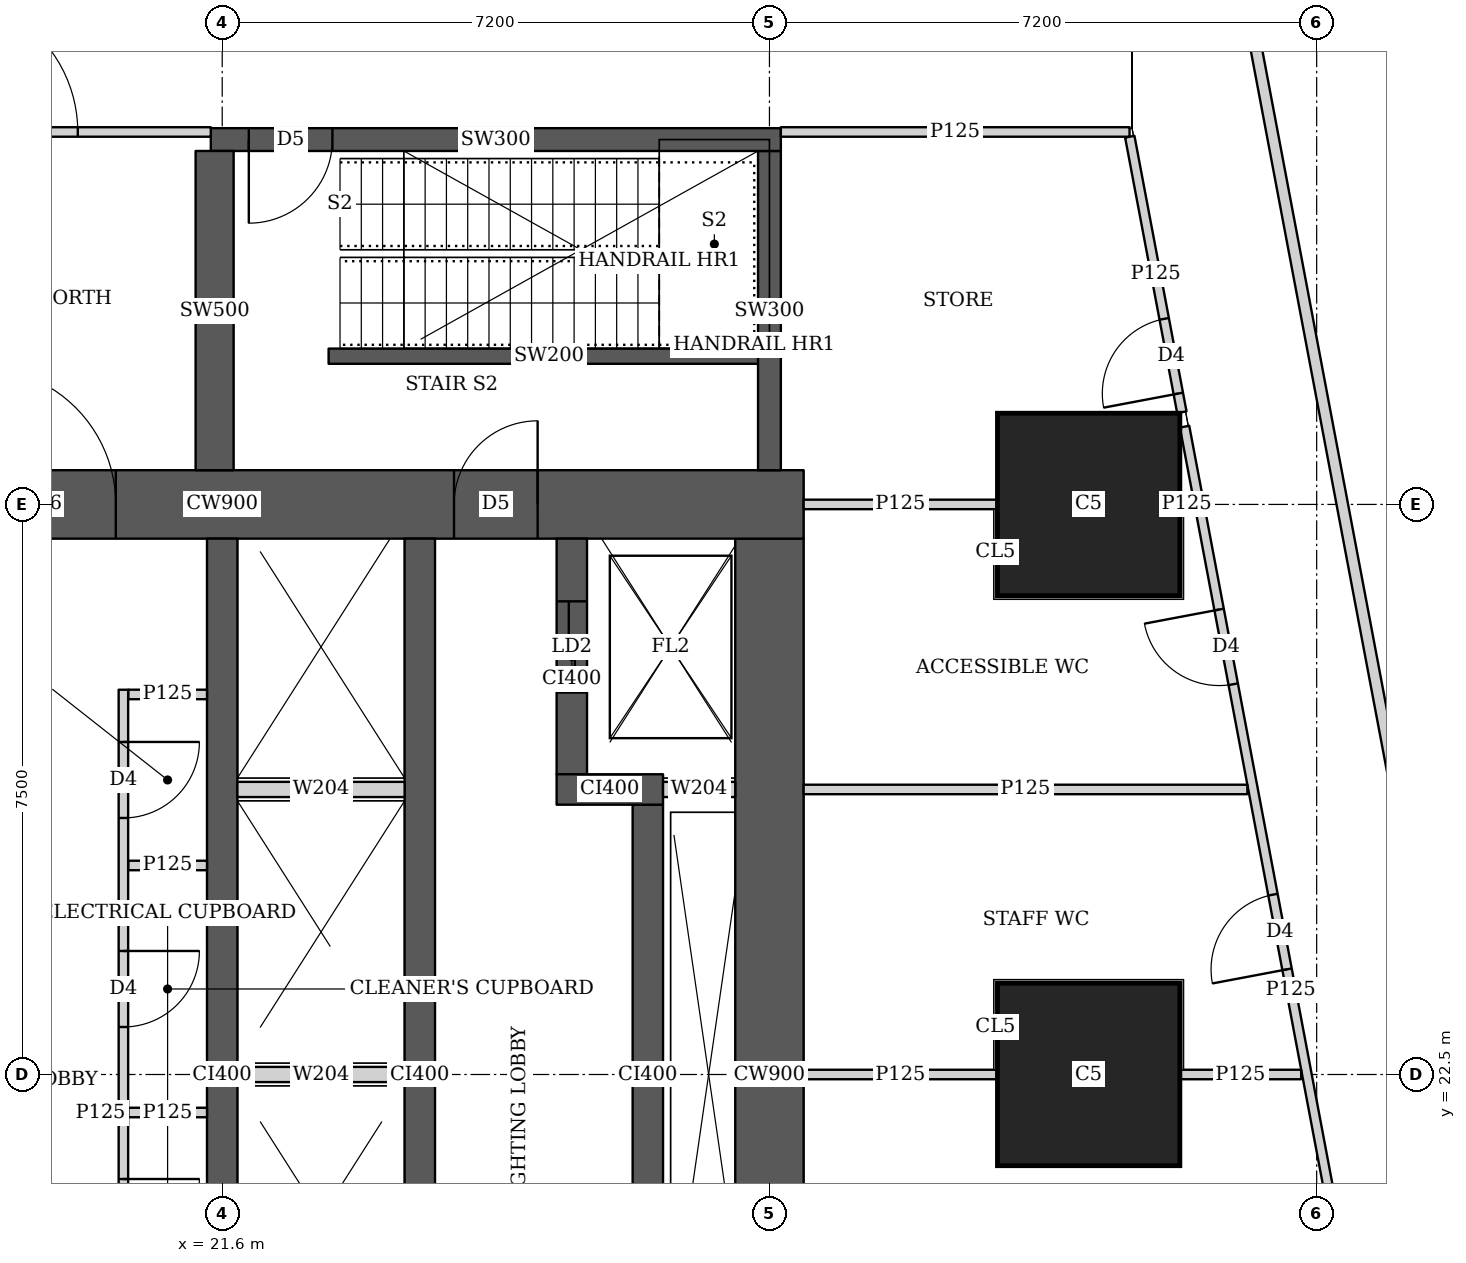
"""IFC4 building model, lengths in metres.
Left out: names, types, materials, properties, quantities, classifications, styles, units other than length and angle.
Written with IfcOpenShell. Run it as: python <this file> out.ifc"""

import sys

from ifc_helpers import new_model, si_unit, direction, frame, frame_2d, origin, origin_2d, place, context, subcontext, project, spatial, rectangle, extrude, element, fill, save


model = new_model("IFC4")
c1 = context("Model", 3, precision=1e-05, world=origin(), true_north=direction((0.0, 1.0)))
c2 = subcontext(c1, "Body", "Model", "MODEL_VIEW")
j1 = project(units=[si_unit("LENGTHUNIT", "METRE"), si_unit("PLANEANGLEUNIT", "RADIAN")], contexts=[c1])
p1 = place(None, origin())
s1 = spatial("IfcSite", under=j1, at=p1, CompositionType="ELEMENT")
p2 = place(p1, origin())
s2 = spatial("IfcBuilding", under=s1, at=p2, CompositionType="ELEMENT")
p3 = place(p2, frame((0.0, 0.0, 14.6)))
s3 = spatial("IfcBuildingStorey", under=s2, at=p3, CompositionType="ELEMENT", Elevation=14.6)
for number, where, z_axis, x_axis in (
    (1, (33.0, 22.5, 0.0), (0.0, 0.0, 1.0), (1.0, 0.0, 0.0)),
    (2, (33.0, 30.0, 0.0), (0.0, 0.0, 1.0), (1.0, 0.0, 0.0)),
):
    element("IfcColumn", number, at=place(p3, frame(where, z_axis=z_axis, x_axis=x_axis)), inside=s3, PredefinedType="COLUMN", context=c2, shape_type="SweptSolid", body=[
        extrude(rectangle(XDim=2.4, YDim=2.4, at=origin_2d()), origin(), (0.0, 0.0, 1.0), 5.4),
    ])
p4 = place(p3, frame((13.95, 30.0, 0.0), z_axis=(0.0, 0.0, 1.0), x_axis=(1.0, 0.0, 0.0)))
e3 = element("IfcWall", 3, at=p4, inside=s3, PredefinedType="SHEAR", context=c2, shape_type="SweptSolid", body=[
    extrude(rectangle(XDim=15.3, YDim=0.9, at=frame_2d((7.65, 0.0))), origin(), (0.0, 0.0, 1.0), 5.4),
])
p5 = place(p4, frame((4.45, 0.0, 0.0)))
e4 = element("IfcOpeningElement", 4, at=p5, cuts=e3, PredefinedType="OPENING", context=c2, shape_type="SweptSolid", body=[
    extrude(rectangle(XDim=1.8, YDim=2.1, at=frame_2d((0.9, 1.05))), frame((0.0, 0.46, 0.0), z_axis=(0.0, -1.0, 0.0), x_axis=(1.0, 0.0, 0.0)), (0.0, 0.0, 1.0), 0.92),
])
p6 = place(p4, frame((10.7, 0.0, 0.0)))
e5 = element("IfcOpeningElement", 5, at=p6, cuts=e3, PredefinedType="OPENING", context=c2, shape_type="SweptSolid", body=[
    extrude(rectangle(XDim=1.1, YDim=2.1, at=frame_2d((0.55, 1.05))), frame((0.0, 0.46, 0.0), z_axis=(0.0, -1.0, 0.0), x_axis=(1.0, 0.0, 0.0)), (0.0, 0.0, 1.0), 0.92),
])
p7 = place(p3, frame((28.8, 15.45, 0.0), z_axis=(0.0, 0.0, 1.0), x_axis=(0.0, 1.0, 0.0)))
e6 = element("IfcWall", 6, at=p7, inside=s3, PredefinedType="SHEAR", context=c2, shape_type="SweptSolid", body=[
    extrude(rectangle(XDim=14.1, YDim=0.9, at=frame_2d((7.05, 0.0))), origin(), (0.0, 0.0, 1.0), 5.4),
])
for number, where, z_axis, x_axis in (
    (7, (21.6, 15.45, 0.0), (0.0, 0.0, 1.0), (0.0, 1.0, 0.0)),
    (8, (24.2, 15.45, 0.0), (0.0, 0.0, 1.0), (0.0, 1.0, 0.0)),
):
    element("IfcWall", number, at=place(p3, frame(where, z_axis=z_axis, x_axis=x_axis)), inside=s3, PredefinedType="SHEAR", context=c2, shape_type="SweptSolid", body=[
        extrude(rectangle(XDim=14.1, YDim=0.4, at=frame_2d((7.05, 0.0))), origin(), (0.0, 0.0, 1.0), 5.4),
    ])
p8 = place(p3, frame((27.2, 18.95, 0.0), z_axis=(0.0, 0.0, 1.0), x_axis=(0.0, 1.0, 0.0)))
e9 = element("IfcWall", 9, at=p8, inside=s3, PredefinedType="SHEAR", context=c2, shape_type="SweptSolid", body=[
    extrude(rectangle(XDim=7.1, YDim=0.4, at=frame_2d((3.55, 0.0))), origin(), (0.0, 0.0, 1.0), 5.4),
])
p9 = place(p3, frame((26.0, 26.25, 0.0), z_axis=(0.0, 0.0, 1.0), x_axis=(1.0, 0.0, 0.0)))
e10 = element("IfcWall", 10, at=p9, inside=s3, PredefinedType="SHEAR", context=c2, shape_type="SweptSolid", body=[
    extrude(rectangle(XDim=1.4, YDim=0.4, at=frame_2d((0.7, 0.0))), origin(), (0.0, 0.0, 1.0), 5.4),
])
p10 = place(p3, frame((26.2, 26.45, 0.0), z_axis=(0.0, 0.0, 1.0), x_axis=(0.0, 1.0, 0.0)))
e11 = element("IfcWall", 11, at=p10, inside=s3, PredefinedType="SHEAR", context=c2, shape_type="SweptSolid", body=[
    extrude(rectangle(XDim=3.1, YDim=0.4, at=frame_2d((1.55, 0.0))), origin(), (0.0, 0.0, 1.0), 5.4),
])
p11 = place(p10, frame((1.075, 0.0, 0.0)))
e12 = element("IfcOpeningElement", 12, at=p11, cuts=e11, PredefinedType="OPENING", context=c2, shape_type="SweptSolid", body=[
    extrude(rectangle(XDim=1.2, YDim=2.1, at=frame_2d((0.6, 1.05))), frame((0.0, 0.21, 0.0), z_axis=(0.0, -1.0, 0.0), x_axis=(1.0, 0.0, 0.0)), (0.0, 0.0, 1.0), 0.42),
])
p12 = place(p3, frame((21.45, 34.8, 0.0), z_axis=(0.0, 0.0, 1.0), x_axis=(1.0, 0.0, 0.0)))
e13 = element("IfcWall", 13, at=p12, inside=s3, PredefinedType="SHEAR", context=c2, shape_type="SweptSolid", body=[
    extrude(rectangle(XDim=7.5, YDim=0.3, at=frame_2d((3.75, 0.0))), origin(), (0.0, 0.0, 1.0), 5.4),
])
p13 = place(p12, frame((0.5, 0.0, 0.0)))
e14 = element("IfcOpeningElement", 14, at=p13, cuts=e13, PredefinedType="OPENING", context=c2, shape_type="SweptSolid", body=[
    extrude(rectangle(XDim=1.1, YDim=2.1, at=frame_2d((0.55, 1.05))), frame((0.0, 0.16, 0.0), z_axis=(0.0, -1.0, 0.0), x_axis=(1.0, 0.0, 0.0)), (0.0, 0.0, 1.0), 0.32),
])
p14 = place(p3, frame((21.5, 30.45, 0.0), z_axis=(0.0, 0.0, 1.0), x_axis=(0.0, 1.0, 0.0)))
e15 = element("IfcWall", 15, at=p14, inside=s3, PredefinedType="SHEAR", context=c2, shape_type="SweptSolid", body=[
    extrude(rectangle(XDim=4.2, YDim=0.5, at=frame_2d((2.1, 0.0))), origin(), (0.0, 0.0, 1.0), 5.4),
])
p15 = place(p3, frame((28.8, 30.45, 0.0), z_axis=(0.0, 0.0, 1.0), x_axis=(0.0, 1.0, 0.0)))
e16 = element("IfcWall", 16, at=p15, inside=s3, PredefinedType="SHEAR", context=c2, shape_type="SweptSolid", body=[
    extrude(rectangle(XDim=4.2, YDim=0.3, at=frame_2d((2.1, 0.0))), origin(), (0.0, 0.0, 1.0), 5.4),
])
p16 = place(p3, frame((35.15, 36.285, 0.0), z_axis=(0.0, 0.0, 1.0), x_axis=(0.185613484682, -0.982622834207, 0.0)))
e17 = element("IfcWall", 17, at=p16, inside=s3, PredefinedType="SOLIDWALL", context=c2, shape_type="SweptSolid", body=[
    extrude(rectangle(XDim=34.351, YDim=0.15, at=frame_2d((17.175, 0.0))), origin(), (0.0, 0.0, 1.0), 3.5),
])
p17 = place(p16, frame((13.652, 0.0, 0.0)))
e18 = element("IfcOpeningElement", 18, at=p17, cuts=e17, PredefinedType="OPENING", context=c2, shape_type="SweptSolid", body=[
    extrude(rectangle(XDim=1.8, YDim=2.4, at=frame_2d((0.9, 1.2))), frame((0.0, 0.085, 0.0), z_axis=(0.0, -1.0, 0.0), x_axis=(1.0, 0.0, 0.0)), (0.0, 0.0, 1.0), 0.17),
])
p18 = place(p3, frame((10.163, 34.9, 0.0), z_axis=(0.0, 0.0, 1.0), x_axis=(1.0, 0.0, 0.0)))
e19 = element("IfcWall", 19, at=p18, inside=s3, PredefinedType="PARTITIONING", context=c2, shape_type="SweptSolid", body=[
    extrude(rectangle(XDim=11.287, YDim=0.125, at=frame_2d((5.644, 0.0))), origin(), (0.0, 0.0, 1.0), 3.1),
])
p19 = place(p18, frame((7.737, 0.0, 0.0)))
e20 = element("IfcOpeningElement", 20, at=p19, cuts=e19, PredefinedType="OPENING", context=c2, shape_type="SweptSolid", body=[
    extrude(rectangle(XDim=1.8, YDim=2.1, at=frame_2d((0.9, 1.05))), frame((0.0, 0.073, 0.0), z_axis=(0.0, -1.0, 0.0), x_axis=(1.0, 0.0, 0.0)), (0.0, 0.0, 1.0), 0.145),
])
p20 = place(p3, frame((28.95, 34.9, 0.0), z_axis=(0.0, 0.0, 1.0), x_axis=(1.0, 0.0, 0.0)))
e21 = element("IfcWall", 21, at=p20, inside=s3, PredefinedType="PARTITIONING", context=c2, shape_type="SweptSolid", body=[
    extrude(rectangle(XDim=4.588, YDim=0.125, at=frame_2d((2.294, 0.0))), origin(), (0.0, 0.0, 1.0), 3.1),
])
p21 = place(p3, frame((37.059, 16.213, 0.0), z_axis=(0.0, 0.0, 1.0), x_axis=(-0.185585225745, 0.982628171785, 0.0)))
e22 = element("IfcWall", 22, at=p21, inside=s3, PredefinedType="PARTITIONING", context=c2, shape_type="SweptSolid", body=[
    extrude(rectangle(XDim=15.072, YDim=0.125, at=frame_2d((7.536, 0.0))), origin(), (0.0, 0.0, 1.0), 3.5),
])
p22 = place(p21, frame((0.25, 0.0, 0.0)))
e23 = element("IfcOpeningElement", 23, at=p22, cuts=e22, PredefinedType="OPENING", context=c2, shape_type="SweptSolid", body=[
    extrude(rectangle(XDim=1.0, YDim=2.1, at=frame_2d((0.5, 1.05))), frame((0.0, 0.073, 0.0), z_axis=(0.0, -1.0, 0.0), x_axis=(1.0, 0.0, 0.0)), (0.0, 0.0, 1.0), 0.145),
])
p23 = place(p21, frame((7.806, 0.0, 0.0)))
e24 = element("IfcOpeningElement", 24, at=p23, cuts=e22, PredefinedType="OPENING", context=c2, shape_type="SweptSolid", body=[
    extrude(rectangle(XDim=1.0, YDim=2.1, at=frame_2d((0.5, 1.05))), frame((0.0, 0.073, 0.0), z_axis=(0.0, -1.0, 0.0), x_axis=(1.0, 0.0, 0.0)), (0.0, 0.0, 1.0), 0.145),
])
p24 = place(p21, frame((11.623, 0.0, 0.0)))
e25 = element("IfcOpeningElement", 25, at=p24, cuts=e22, PredefinedType="OPENING", context=c2, shape_type="SweptSolid", body=[
    extrude(rectangle(XDim=1.0, YDim=2.1, at=frame_2d((0.5, 1.05))), frame((0.0, 0.073, 0.0), z_axis=(0.0, -1.0, 0.0), x_axis=(1.0, 0.0, 0.0)), (0.0, 0.0, 1.0), 0.145),
])
p25 = place(p3, frame((34.226, 31.213, 0.0), z_axis=(0.0, 0.0, 1.0), x_axis=(-0.185694811189, 0.982607468472, 0.0)))
e26 = element("IfcWall", 26, at=p25, inside=s3, PredefinedType="PARTITIONING", context=c2, shape_type="SweptSolid", body=[
    extrude(rectangle(XDim=3.689, YDim=0.125, at=frame_2d((1.845, 0.0))), origin(), (0.0, 0.0, 1.0), 5.1),
])
p26 = place(p25, frame((0.25, 0.0, 0.0)))
e27 = element("IfcOpeningElement", 27, at=p26, cuts=e26, PredefinedType="OPENING", context=c2, shape_type="SweptSolid", body=[
    extrude(rectangle(XDim=1.0, YDim=2.1, at=frame_2d((0.5, 1.05))), frame((0.0, 0.073, 0.0), z_axis=(0.0, -1.0, 0.0), x_axis=(1.0, 0.0, 0.0)), (0.0, 0.0, 1.0), 0.145),
])
p27 = place(p3, frame((29.25, 22.5, 0.0), z_axis=(0.0, 0.0, 1.0), x_axis=(1.0, 0.0, 0.0)))
e28 = element("IfcWall", 28, at=p27, inside=s3, PredefinedType="PARTITIONING", context=c2, shape_type="SweptSolid", body=[
    extrude(rectangle(XDim=2.549, YDim=0.125, at=frame_2d((1.274, 0.0))), origin(), (0.0, 0.0, 1.0), 3.5),
])
p28 = place(p3, frame((34.201, 22.5, 0.0), z_axis=(0.0, 0.0, 1.0), x_axis=(1.0, 0.0, 0.0)))
e29 = element("IfcWall", 29, at=p28, inside=s3, PredefinedType="PARTITIONING", context=c2, shape_type="SweptSolid", body=[
    extrude(rectangle(XDim=1.595, YDim=0.125, at=frame_2d((0.797, 0.0))), origin(), (0.0, 0.0, 1.0), 3.5),
])
p29 = place(p3, frame((29.25, 30.0, 0.0), z_axis=(0.0, 0.0, 1.0), x_axis=(1.0, 0.0, 0.0)))
e30 = element("IfcWall", 30, at=p29, inside=s3, PredefinedType="PARTITIONING", context=c2, shape_type="SweptSolid", body=[
    extrude(rectangle(XDim=2.549, YDim=0.125, at=frame_2d((1.274, 0.0))), origin(), (0.0, 0.0, 1.0), 5.1),
])
p30 = place(p3, frame((34.201, 30.0, 0.0), z_axis=(0.0, 0.0, 1.0), x_axis=(1.0, 0.0, 0.0)))
e31 = element("IfcWall", 31, at=p30, inside=s3, PredefinedType="PARTITIONING", context=c2, shape_type="SweptSolid", body=[
    extrude(rectangle(XDim=0.178, YDim=0.125, at=frame_2d((0.089, 0.0))), origin(), (0.0, 0.0, 1.0), 3.5),
])
p31 = place(p3, frame((29.25, 26.25, 0.0), z_axis=(0.0, 0.0, 1.0), x_axis=(1.0, 0.0, 0.0)))
e32 = element("IfcWall", 32, at=p31, inside=s3, PredefinedType="PARTITIONING", context=c2, shape_type="SweptSolid", body=[
    extrude(rectangle(XDim=5.838, YDim=0.125, at=frame_2d((2.919, 0.0))), origin(), (0.0, 0.0, 1.0), 5.1),
])
p32 = place(p3, frame((20.3, 16.438, 0.0), z_axis=(0.0, 0.0, 1.0), x_axis=(0.0, 1.0, 0.0)))
e33 = element("IfcWall", 33, at=p32, inside=s3, PredefinedType="PARTITIONING", context=c2, shape_type="SweptSolid", body=[
    extrude(rectangle(XDim=11.124, YDim=0.125, at=frame_2d((5.562, 0.0))), origin(), (0.0, 0.0, 1.0), 5.1),
])
p33 = place(p32, frame((0.937, 0.0, 0.0)))
e34 = element("IfcOpeningElement", 34, at=p33, cuts=e33, PredefinedType="OPENING", context=c2, shape_type="SweptSolid", body=[
    extrude(rectangle(XDim=1.0, YDim=2.1, at=frame_2d((0.5, 1.05))), frame((0.0, 0.073, 0.0), z_axis=(0.0, -1.0, 0.0), x_axis=(1.0, 0.0, 0.0)), (0.0, 0.0, 1.0), 0.145),
])
p34 = place(p32, frame((3.687, 0.0, 0.0)))
e35 = element("IfcOpeningElement", 35, at=p34, cuts=e33, PredefinedType="OPENING", context=c2, shape_type="SweptSolid", body=[
    extrude(rectangle(XDim=1.0, YDim=2.1, at=frame_2d((0.5, 1.05))), frame((0.0, 0.073, 0.0), z_axis=(0.0, -1.0, 0.0), x_axis=(1.0, 0.0, 0.0)), (0.0, 0.0, 1.0), 0.145),
])
p35 = place(p32, frame((6.687, 0.0, 0.0)))
e36 = element("IfcOpeningElement", 36, at=p35, cuts=e33, PredefinedType="OPENING", context=c2, shape_type="SweptSolid", body=[
    extrude(rectangle(XDim=1.0, YDim=2.1, at=frame_2d((0.5, 1.05))), frame((0.0, 0.073, 0.0), z_axis=(0.0, -1.0, 0.0), x_axis=(1.0, 0.0, 0.0)), (0.0, 0.0, 1.0), 0.145),
])
p36 = place(p32, frame((9.437, 0.0, 0.0)))
e37 = element("IfcOpeningElement", 37, at=p36, cuts=e33, PredefinedType="OPENING", context=c2, shape_type="SweptSolid", body=[
    extrude(rectangle(XDim=1.0, YDim=2.1, at=frame_2d((0.5, 1.05))), frame((0.0, 0.073, 0.0), z_axis=(0.0, -1.0, 0.0), x_axis=(1.0, 0.0, 0.0)), (0.0, 0.0, 1.0), 0.145),
])
for number, where, z_axis, x_axis in (
    (38, (20.363, 27.5, 0.0), (0.0, 0.0, 1.0), (1.0, 0.0, 0.0)),
    (39, (20.363, 22.0, 0.0), (0.0, 0.0, 1.0), (1.0, 0.0, 0.0)),
    (40, (20.363, 25.25, 0.0), (0.0, 0.0, 1.0), (1.0, 0.0, 0.0)),
):
    element("IfcWall", number, at=place(p3, frame(where, z_axis=z_axis, x_axis=x_axis)), inside=s3, PredefinedType="PARTITIONING", context=c2, shape_type="SweptSolid", body=[
        extrude(rectangle(XDim=1.037, YDim=0.125, at=frame_2d((0.519, 0.0))), origin(), (0.0, 0.0, 1.0), 5.1),
    ])
p37 = place(p3, frame((23.0, 31.95, 0.0), z_axis=(0.0, 0.0, 1.0), x_axis=(1.0, 0.0, 0.0)))
e41 = element("IfcWall", 41, at=p37, inside=s3, PredefinedType="SHEAR", context=c2, shape_type="SweptSolid", body=[
    extrude(rectangle(XDim=5.8, YDim=0.2, at=frame_2d((2.9, 0.0))), origin(), (0.0, 0.0, 1.0), 5.4),
])
for number, where, z_axis, x_axis in (
    (42, (21.8, 22.5, 0.0), (0.0, 0.0, 1.0), (1.0, 0.0, 0.0)),
    (43, (21.8, 26.25, 0.0), (0.0, 0.0, 1.0), (1.0, 0.0, 0.0)),
):
    element("IfcWall", number, at=place(p3, frame(where, z_axis=z_axis, x_axis=x_axis)), inside=s3, PredefinedType="SOLIDWALL", context=c2, shape_type="SweptSolid", body=[
        extrude(rectangle(XDim=2.2, YDim=0.2, at=frame_2d((1.1, 0.0))), origin(), (0.0, 0.0, 1.0), 5.1),
    ])
p38 = place(p3, frame((27.4, 26.25, 0.0), z_axis=(0.0, 0.0, 1.0), x_axis=(1.0, 0.0, 0.0)))
e44 = element("IfcWall", 44, at=p38, inside=s3, PredefinedType="SOLIDWALL", context=c2, shape_type="SweptSolid", body=[
    extrude(rectangle(XDim=0.95, YDim=0.2, at=frame_2d((0.475, 0.0))), origin(), (0.0, 0.0, 1.0), 5.1),
])
p39 = place(p19, origin())
e45 = element("IfcDoor", 45, at=p39, inside=s3, OperationType="DOUBLE_DOOR_SINGLE_SWING", PredefinedType="DOOR", context=c2, shape_type="SweptSolid", body=[
    extrude(rectangle(XDim=1.8, YDim=2.1, at=frame_2d((0.9, 1.05))), frame((0.0, 0.025, 0.0), z_axis=(0.0, -1.0, 0.0), x_axis=(1.0, 0.0, 0.0)), (0.0, 0.0, 1.0), 0.05),
])
fill(e20, e45)
p40 = place(p26, origin())
e46 = element("IfcDoor", 46, at=p40, inside=s3, OperationType="SINGLE_SWING_LEFT", PredefinedType="DOOR", context=c2, shape_type="SweptSolid", body=[
    extrude(rectangle(XDim=1.0, YDim=2.1, at=frame_2d((0.5, 1.05))), frame((0.0, 0.025, 0.0), z_axis=(0.0, -1.0, 0.0), x_axis=(1.0, 0.0, 0.0)), (0.0, 0.0, 1.0), 0.05),
])
fill(e27, e46)
p41 = place(p23, origin())
e47 = element("IfcDoor", 47, at=p41, inside=s3, OperationType="SINGLE_SWING_LEFT", PredefinedType="DOOR", context=c2, shape_type="SweptSolid", body=[
    extrude(rectangle(XDim=1.0, YDim=2.1, at=frame_2d((0.5, 1.05))), frame((0.0, 0.025, 0.0), z_axis=(0.0, -1.0, 0.0), x_axis=(1.0, 0.0, 0.0)), (0.0, 0.0, 1.0), 0.05),
])
fill(e24, e47)
p42 = place(p24, origin())
e48 = element("IfcDoor", 48, at=p42, inside=s3, OperationType="SINGLE_SWING_RIGHT", PredefinedType="DOOR", context=c2, shape_type="SweptSolid", body=[
    extrude(rectangle(XDim=1.0, YDim=2.1, at=frame_2d((0.5, 1.05))), frame((0.0, 0.025, 0.0), z_axis=(0.0, -1.0, 0.0), x_axis=(1.0, 0.0, 0.0)), (0.0, 0.0, 1.0), 0.05),
])
fill(e25, e48)
p43 = place(p34, origin())
e49 = element("IfcDoor", 49, at=p43, inside=s3, OperationType="SINGLE_SWING_LEFT", PredefinedType="DOOR", context=c2, shape_type="SweptSolid", body=[
    extrude(rectangle(XDim=1.0, YDim=2.1, at=frame_2d((0.5, 1.05))), frame((0.0, 0.025, 0.0), z_axis=(0.0, -1.0, 0.0), x_axis=(1.0, 0.0, 0.0)), (0.0, 0.0, 1.0), 0.05),
])
fill(e35, e49)
p44 = place(p35, origin())
e50 = element("IfcDoor", 50, at=p44, inside=s3, OperationType="SINGLE_SWING_LEFT", PredefinedType="DOOR", context=c2, shape_type="SweptSolid", body=[
    extrude(rectangle(XDim=1.0, YDim=2.1, at=frame_2d((0.5, 1.05))), frame((0.0, 0.025, 0.0), z_axis=(0.0, -1.0, 0.0), x_axis=(1.0, 0.0, 0.0)), (0.0, 0.0, 1.0), 0.05),
])
fill(e36, e50)
p45 = place(p36, origin())
e51 = element("IfcDoor", 51, at=p45, inside=s3, OperationType="SINGLE_SWING_LEFT", PredefinedType="DOOR", context=c2, shape_type="SweptSolid", body=[
    extrude(rectangle(XDim=1.0, YDim=2.1, at=frame_2d((0.5, 1.05))), frame((0.0, 0.025, 0.0), z_axis=(0.0, -1.0, 0.0), x_axis=(1.0, 0.0, 0.0)), (0.0, 0.0, 1.0), 0.05),
])
fill(e37, e51)
p46 = place(p5, origin())
e52 = element("IfcDoor", 52, at=p46, inside=s3, OperationType="DOUBLE_DOOR_SINGLE_SWING", PredefinedType="DOOR", context=c2, shape_type="SweptSolid", body=[
    extrude(rectangle(XDim=1.8, YDim=2.1, at=frame_2d((0.9, 1.05))), frame((0.0, 0.025, 0.0), z_axis=(0.0, -1.0, 0.0), x_axis=(1.0, 0.0, 0.0)), (0.0, 0.0, 1.0), 0.05),
])
fill(e4, e52)
p47 = place(p6, origin())
e53 = element("IfcDoor", 53, at=p47, inside=s3, OperationType="SINGLE_SWING_RIGHT", PredefinedType="DOOR", context=c2, shape_type="SweptSolid", body=[
    extrude(rectangle(XDim=1.1, YDim=2.1, at=frame_2d((0.55, 1.05))), frame((0.0, 0.025, 0.0), z_axis=(0.0, -1.0, 0.0), x_axis=(1.0, 0.0, 0.0)), (0.0, 0.0, 1.0), 0.05),
])
fill(e5, e53)
p48 = place(p11, origin())
e54 = element("IfcDoor", 54, at=p48, inside=s3, OperationType="DOUBLE_DOOR_SLIDING", PredefinedType="DOOR", context=c2, shape_type="SweptSolid", body=[
    extrude(rectangle(XDim=1.2, YDim=2.1, at=frame_2d((0.6, 1.05))), frame((0.0, 0.025, 0.0), z_axis=(0.0, -1.0, 0.0), x_axis=(1.0, 0.0, 0.0)), (0.0, 0.0, 1.0), 0.05),
])
fill(e12, e54)
p49 = place(p13, origin())
e55 = element("IfcDoor", 55, at=p49, inside=s3, OperationType="SINGLE_SWING_RIGHT", PredefinedType="DOOR", context=c2, shape_type="SweptSolid", body=[
    extrude(rectangle(XDim=1.1, YDim=2.1, at=frame_2d((0.55, 1.05))), frame((0.0, 0.025, 0.0), z_axis=(0.0, -1.0, 0.0), x_axis=(1.0, 0.0, 0.0)), (0.0, 0.0, 1.0), 0.05),
])
fill(e14, e55)
save(model, sys.argv[1])
